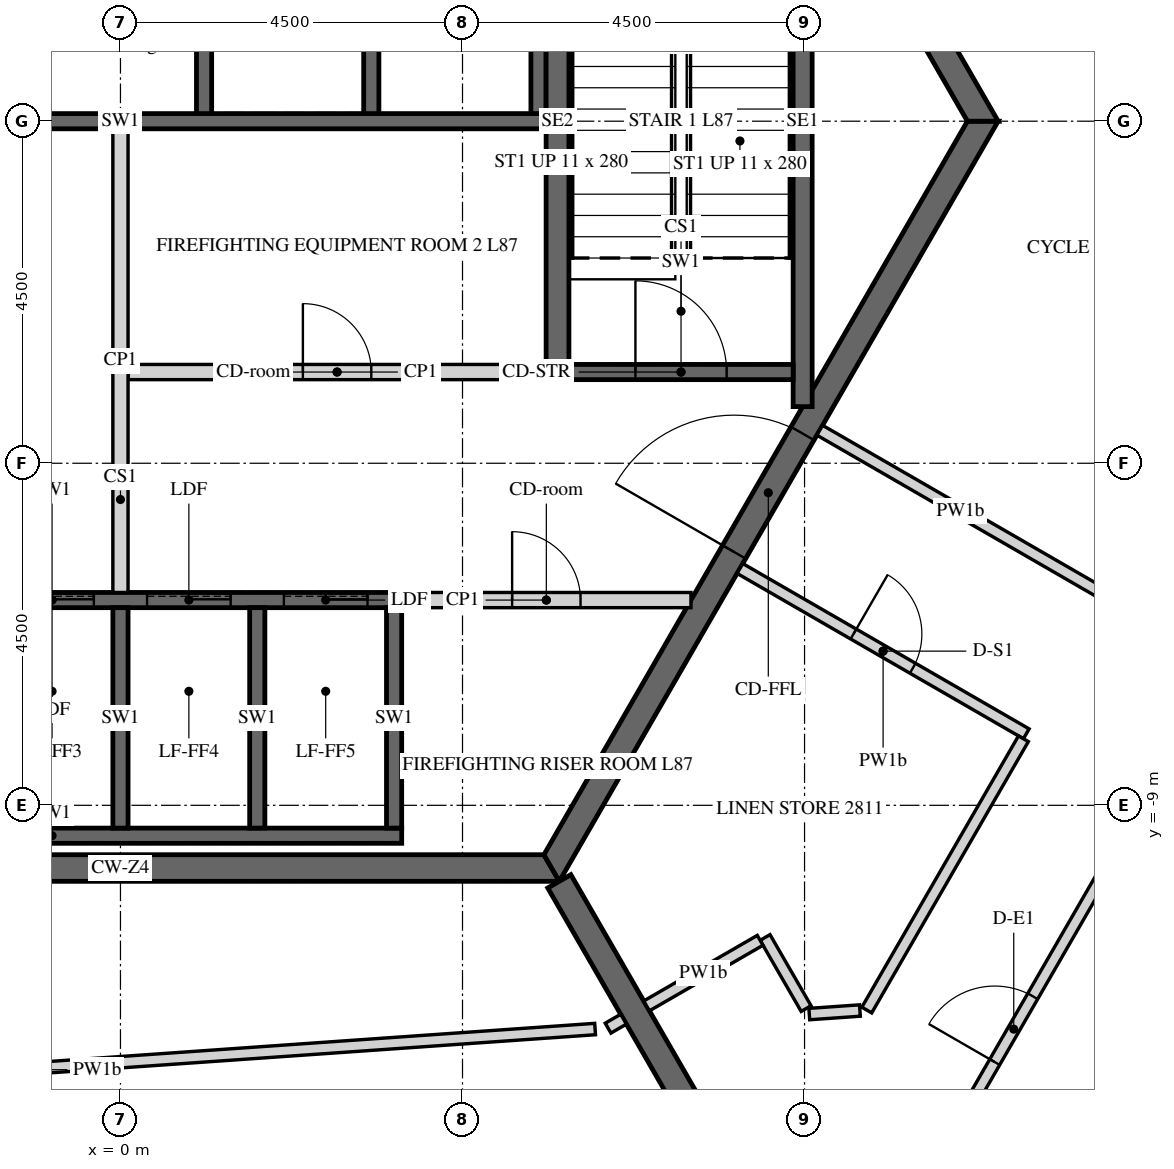
"""IFC4 building model, lengths in metres.
Left out: names, types, materials, properties, quantities, classifications, styles, units other than length and angle.
Written with IfcOpenShell. Run it as: python <this file> out.ifc"""

import sys

from ifc_helpers import new_model, si_unit, direction, frame, frame_2d, origin, place, context, subcontext, project, spatial, polyline, rectangle, outline, extrude, element, fill, save


model = new_model("IFC4")
c1 = context("Model", 3, precision=1e-05, world=origin(), true_north=direction((0.0, 1.0)))
c2 = subcontext(c1, "Body", "Model", "MODEL_VIEW")
j1 = project(units=[si_unit("LENGTHUNIT", "METRE"), si_unit("PLANEANGLEUNIT", "RADIAN")], contexts=[c1])
p1 = place(None, origin())
s1 = spatial("IfcSite", under=j1, at=p1, CompositionType="ELEMENT")
p2 = place(p1, origin())
s2 = spatial("IfcBuilding", under=s1, at=p2, CompositionType="ELEMENT")
p3 = place(p2, frame((0.0, 0.0, 361.2)))
s3 = spatial("IfcBuildingStorey", under=s2, at=p3, CompositionType="ELEMENT", Elevation=361.2)
p4 = place(p3, frame((-5.673, -9.825, -0.15), z_axis=(0.0, 0.0, 1.0), x_axis=(1.0, 0.0, 0.0)))
e1 = element("IfcWall", 1, at=p4, inside=s3, PredefinedType="SHEAR", context=c2, shape_type="SweptSolid", body=[
    extrude(outline(polyline([(-0.101, -0.175), (11.446, -0.175), (11.244, 0.175), (0.101, 0.175), (-0.101, -0.175)])), origin(), (0.0, 0.0, 1.0), 3.9),
])
p5 = place(p3, frame((5.673, -9.825, -0.15), z_axis=(0.0, 0.0, 1.0), x_axis=(0.499995046907, 0.866028263435, 0.0)))
e2 = element("IfcWall", 2, at=p5, inside=s3, PredefinedType="SHEAR", context=c2, shape_type="SweptSolid", body=[
    extrude(outline(polyline([(-0.101, -0.175), (11.446, -0.175), (11.244, 0.175), (0.101, 0.175), (-0.101, -0.175)])), origin(), (0.0, 0.0, 1.0), 3.9),
])
p6 = place(p5, frame((4.801, 0.0, 0.15)))
e3 = element("IfcOpeningElement", 3, at=p6, cuts=e2, PredefinedType="OPENING", context=c2, shape_type="SweptSolid", body=[
    extrude(rectangle(XDim=1.8, YDim=2.4, at=frame_2d((0.9, 1.2))), frame((0.0, 0.185, 0.0), z_axis=(0.0, -1.0, 0.0), x_axis=(1.0, 0.0, 0.0)), (0.0, 0.0, 1.0), 0.37),
])
p7 = place(p3, frame((11.345, 0.0, -0.15), z_axis=(0.0, 0.0, 1.0), x_axis=(-0.499995046907, 0.866028263435, 0.0)))
e4 = element("IfcWall", 4, at=p7, inside=s3, PredefinedType="SHEAR", context=c2, shape_type="SweptSolid", body=[
    extrude(outline(polyline([(-0.101, -0.175), (11.446, -0.175), (11.244, 0.175), (0.101, 0.175), (-0.101, -0.175)])), origin(), (0.0, 0.0, 1.0), 3.9),
])
p8 = place(p7, frame((4.744, 0.0, 0.15)))
e5 = element("IfcOpeningElement", 5, at=p8, cuts=e4, PredefinedType="OPENING", context=c2, shape_type="SweptSolid", body=[
    extrude(rectangle(XDim=1.8, YDim=2.4, at=frame_2d((0.9, 1.2))), frame((0.0, 0.185, 0.0), z_axis=(0.0, -1.0, 0.0), x_axis=(1.0, 0.0, 0.0)), (0.0, 0.0, 1.0), 0.37),
])
p9 = place(p3, frame((5.773, -10.0, -0.15), z_axis=(0.0, 0.0, 1.0), x_axis=(0.500007911273, -0.866020836161, 0.0)))
e6 = element("IfcWall", 6, at=p9, inside=s3, PredefinedType="SHEAR", context=c2, shape_type="SweptSolid", body=[
    extrude(rectangle(XDim=14.51, YDim=0.35, at=frame_2d((7.255, 0.0))), origin(), (0.0, 0.0, 1.0), 3.9),
])
p10 = place(p9, frame((6.355, 0.0, 0.15)))
e7 = element("IfcOpeningElement", 7, at=p10, cuts=e6, PredefinedType="OPENING", context=c2, shape_type="SweptSolid", body=[
    extrude(rectangle(XDim=1.8, YDim=2.4, at=frame_2d((0.9, 1.2))), frame((0.0, 0.185, 0.0), z_axis=(0.0, -1.0, 0.0), x_axis=(1.0, 0.0, 0.0)), (0.0, 0.0, 1.0), 0.37),
])
p11 = place(p3, frame((-5.6, 0.0, -0.25), z_axis=(0.0, 0.0, 1.0), x_axis=(1.0, 0.0, 0.0)))
e8 = element("IfcWall", 8, at=p11, inside=s3, PredefinedType="SHEAR", context=c2, shape_type="SweptSolid", body=[
    extrude(rectangle(XDim=11.2, YDim=0.2, at=frame_2d((5.6, 0.0))), origin(), (0.0, 0.0, 1.0), 3.9),
])
for number, where, z_axis, x_axis in (
    (9, (1.1, 0.1, -0.25), (0.0, 0.0, 1.0), (0.0, 1.0, 0.0)),
    (10, (3.3, 0.1, -0.25), (0.0, 0.0, 1.0), (0.0, 1.0, 0.0)),
):
    element("IfcWall", number, at=place(p3, frame(where, z_axis=z_axis, x_axis=x_axis)), inside=s3, PredefinedType="SHEAR", context=c2, shape_type="SweptSolid", body=[
        extrude(rectangle(XDim=3.3, YDim=0.2, at=frame_2d((1.65, 0.0))), origin(), (0.0, 0.0, 1.0), 3.9),
    ])
p12 = place(p3, frame((5.5, 0.1, -0.25), z_axis=(0.0, 0.0, 1.0), x_axis=(0.0, 1.0, 0.0)))
e11 = element("IfcWall", 11, at=p12, inside=s3, PredefinedType="SHEAR", context=c2, shape_type="SweptSolid", body=[
    extrude(rectangle(XDim=3.1, YDim=0.2, at=frame_2d((1.55, 0.0))), origin(), (0.0, 0.0, 1.0), 3.9),
])
p13 = place(p3, frame((-5.5, -6.3, -0.25), z_axis=(0.0, 0.0, 1.0), x_axis=(1.0, 0.0, 0.0)))
e12 = element("IfcWall", 12, at=p13, inside=s3, PredefinedType="SHEAR", context=c2, shape_type="SweptSolid", body=[
    extrude(rectangle(XDim=9.2, YDim=0.2, at=frame_2d((4.6, 0.0))), origin(), (0.0, 0.0, 1.0), 3.9),
])
p14 = place(p13, frame((0.45, 0.0, 0.25)))
e13 = element("IfcOpeningElement", 13, at=p14, cuts=e12, PredefinedType="OPENING", context=c2, shape_type="SweptSolid", body=[
    extrude(rectangle(XDim=1.1, YDim=2.1, at=frame_2d((0.55, 1.05))), frame((0.0, 0.11, 0.0), z_axis=(0.0, -1.0, 0.0), x_axis=(1.0, 0.0, 0.0)), (0.0, 0.0, 1.0), 0.22),
])
p15 = place(p13, frame((2.25, 0.0, 0.25)))
e14 = element("IfcOpeningElement", 14, at=p15, cuts=e12, PredefinedType="OPENING", context=c2, shape_type="SweptSolid", body=[
    extrude(rectangle(XDim=1.1, YDim=2.1, at=frame_2d((0.55, 1.05))), frame((0.0, 0.11, 0.0), z_axis=(0.0, -1.0, 0.0), x_axis=(1.0, 0.0, 0.0)), (0.0, 0.0, 1.0), 0.22),
])
p16 = place(p13, frame((4.05, 0.0, 0.25)))
e15 = element("IfcOpeningElement", 15, at=p16, cuts=e12, PredefinedType="OPENING", context=c2, shape_type="SweptSolid", body=[
    extrude(rectangle(XDim=1.1, YDim=2.1, at=frame_2d((0.55, 1.05))), frame((0.0, 0.11, 0.0), z_axis=(0.0, -1.0, 0.0), x_axis=(1.0, 0.0, 0.0)), (0.0, 0.0, 1.0), 0.22),
])
p17 = place(p13, frame((5.85, 0.0, 0.25)))
e16 = element("IfcOpeningElement", 16, at=p17, cuts=e12, PredefinedType="OPENING", context=c2, shape_type="SweptSolid", body=[
    extrude(rectangle(XDim=1.1, YDim=2.1, at=frame_2d((0.55, 1.05))), frame((0.0, 0.11, 0.0), z_axis=(0.0, -1.0, 0.0), x_axis=(1.0, 0.0, 0.0)), (0.0, 0.0, 1.0), 0.22),
])
p18 = place(p13, frame((7.65, 0.0, 0.25)))
e17 = element("IfcOpeningElement", 17, at=p18, cuts=e12, PredefinedType="OPENING", context=c2, shape_type="SweptSolid", body=[
    extrude(rectangle(XDim=1.1, YDim=2.1, at=frame_2d((0.55, 1.05))), frame((0.0, 0.11, 0.0), z_axis=(0.0, -1.0, 0.0), x_axis=(1.0, 0.0, 0.0)), (0.0, 0.0, 1.0), 0.22),
])
p19 = place(p3, frame((-5.5, -9.4, -0.25), z_axis=(0.0, 0.0, 1.0), x_axis=(1.0, 0.0, 0.0)))
e18 = element("IfcWall", 18, at=p19, inside=s3, PredefinedType="SHEAR", context=c2, shape_type="SweptSolid", body=[
    extrude(rectangle(XDim=9.2, YDim=0.2, at=frame_2d((4.6, 0.0))), origin(), (0.0, 0.0, 1.0), 3.9),
])
for number, where, z_axis, x_axis in (
    (19, (0.0, -9.3, -0.25), (0.0, 0.0, 1.0), (0.0, 1.0, 0.0)),
    (20, (1.8, -9.3, -0.25), (0.0, 0.0, 1.0), (0.0, 1.0, 0.0)),
    (21, (3.6, -9.3, -0.25), (0.0, 0.0, 1.0), (0.0, 1.0, 0.0)),
):
    element("IfcWall", number, at=place(p3, frame(where, z_axis=z_axis, x_axis=x_axis)), inside=s3, PredefinedType="SHEAR", context=c2, shape_type="SweptSolid", body=[
        extrude(rectangle(XDim=2.9, YDim=0.2, at=frame_2d((1.45, 0.0))), origin(), (0.0, 0.0, 1.0), 3.9),
    ])
p20 = place(p3, frame((0.1, -3.3, 0.0), z_axis=(0.0, 0.0, 1.0), x_axis=(1.0, 0.0, 0.0)))
e22 = element("IfcWall", 22, at=p20, inside=s3, PredefinedType="PARTITIONING", context=c2, shape_type="SweptSolid", body=[
    extrude(rectangle(XDim=5.5, YDim=0.2, at=frame_2d((2.75, 0.0))), origin(), (0.0, 0.0, 1.0), 3.65),
])
p21 = place(p20, frame((2.3, 0.0, 0.0)))
e23 = element("IfcOpeningElement", 23, at=p21, cuts=e22, PredefinedType="OPENING", context=c2, shape_type="SweptSolid", body=[
    extrude(rectangle(XDim=0.9, YDim=2.1, at=frame_2d((0.45, 1.05))), frame((0.0, 0.11, 0.0), z_axis=(0.0, -1.0, 0.0), x_axis=(1.0, 0.0, 0.0)), (0.0, 0.0, 1.0), 0.22),
])
p22 = place(p3, frame((0.0, -6.2, 0.0), z_axis=(0.0, 0.0, 1.0), x_axis=(0.0, 1.0, 0.0)))
e24 = element("IfcWall", 24, at=p22, inside=s3, PredefinedType="PARTITIONING", context=c2, shape_type="SweptSolid", body=[
    extrude(rectangle(XDim=6.1, YDim=0.2, at=frame_2d((3.05, 0.0))), origin(), (0.0, 0.0, 1.0), 3.65),
])
p23 = place(p3, frame((3.7, -6.3, 0.0), z_axis=(0.0, 0.0, 1.0), x_axis=(1.0, 0.0, 0.0)))
e25 = element("IfcWall", 25, at=p23, inside=s3, PredefinedType="PARTITIONING", context=c2, shape_type="SweptSolid", body=[
    extrude(rectangle(XDim=3.806, YDim=0.2, at=frame_2d((1.903, 0.0))), origin(), (0.0, 0.0, 1.0), 3.65),
])
p24 = place(p23, frame((1.453, 0.0, 0.0)))
e26 = element("IfcOpeningElement", 26, at=p24, cuts=e25, PredefinedType="OPENING", context=c2, shape_type="SweptSolid", body=[
    extrude(rectangle(XDim=0.9, YDim=2.1, at=frame_2d((0.45, 1.05))), frame((0.0, 0.11, 0.0), z_axis=(0.0, -1.0, 0.0), x_axis=(1.0, 0.0, 0.0)), (0.0, 0.0, 1.0), 0.22),
])
p25 = place(p3, frame((5.75, -3.4, -0.25), z_axis=(0.0, 0.0, 1.0), x_axis=(0.0, 1.0, 0.0)))
e27 = element("IfcWall", 27, at=p25, inside=s3, PredefinedType="SHEAR", context=c2, shape_type="SweptSolid", body=[
    extrude(rectangle(XDim=6.8, YDim=0.3, at=frame_2d((3.4, 0.0))), origin(), (0.0, 0.0, 1.0), 3.9),
])
p26 = place(p3, frame((8.975, -3.755, -0.25), z_axis=(0.0, 0.0, 1.0), x_axis=(0.0, 1.0, 0.0)))
e28 = element("IfcWall", 28, at=p26, inside=s3, PredefinedType="SHEAR", context=c2, shape_type="SweptSolid", body=[
    extrude(rectangle(XDim=7.51, YDim=0.25, at=frame_2d((3.755, 0.0))), origin(), (0.0, 0.0, 1.0), 3.9),
])
p27 = place(p3, frame((5.9, -3.3, -0.25), z_axis=(0.0, 0.0, 1.0), x_axis=(1.0, 0.0, 0.0)))
e29 = element("IfcWall", 29, at=p27, inside=s3, PredefinedType="SHEAR", context=c2, shape_type="SweptSolid", body=[
    extrude(rectangle(XDim=2.95, YDim=0.2, at=frame_2d((1.475, 0.0))), origin(), (0.0, 0.0, 1.0), 3.9),
])
p28 = place(p27, frame((0.875, 0.0, 0.25)))
e30 = element("IfcOpeningElement", 30, at=p28, cuts=e29, PredefinedType="OPENING", context=c2, shape_type="SweptSolid", body=[
    extrude(rectangle(XDim=1.2, YDim=2.4, at=frame_2d((0.6, 1.2))), frame((0.0, 0.11, 0.0), z_axis=(0.0, -1.0, 0.0), x_axis=(1.0, 0.0, 0.0)), (0.0, 0.0, 1.0), 0.22),
])
p29 = place(p3, frame((6.619, -11.814, 0.0), z_axis=(0.0, 0.0, 1.0), x_axis=(-0.865544827262, -0.500831460673, 0.0)))
e31 = element("IfcWall", 31, at=p29, inside=s3, PredefinedType="PARTITIONING", context=c2, shape_type="SweptSolid", body=[
    extrude(rectangle(XDim=0.235, YDim=0.15, at=frame_2d((0.117, 0.0))), origin(), (0.0, 0.0, 1.0), 2.82),
])
p30 = place(p3, frame((6.245, -11.944, 0.0), z_axis=(0.0, 0.0, 1.0), x_axis=(-0.997564707029, -0.069747080866, 0.0)))
e32 = element("IfcWall", 32, at=p30, inside=s3, PredefinedType="PARTITIONING", context=c2, shape_type="SweptSolid", body=[
    extrude(rectangle(XDim=15.339, YDim=0.15, at=frame_2d((7.669, 0.0))), origin(), (0.0, 0.0, 1.0), 2.82),
])
p31 = place(p30, frame((7.219, 0.0, 0.0)))
e33 = element("IfcOpeningElement", 33, at=p31, cuts=e32, PredefinedType="OPENING", context=c2, shape_type="SweptSolid", body=[
    extrude(rectangle(XDim=0.9, YDim=2.1, at=frame_2d((0.45, 1.05))), frame((0.0, 0.085, 0.0), z_axis=(0.0, -1.0, 0.0), x_axis=(1.0, 0.0, 0.0)), (0.0, 0.0, 1.0), 0.17),
])
p32 = place(p3, frame((10.944, -13.344, 0.0), z_axis=(0.0, 0.0, 1.0), x_axis=(0.500003210163, 0.866023550388, 0.0)))
e34 = element("IfcWall", 34, at=p32, inside=s3, PredefinedType="PARTITIONING", context=c2, shape_type="SweptSolid", body=[
    extrude(rectangle(XDim=13.951, YDim=0.15, at=frame_2d((6.975, 0.0))), origin(), (0.0, 0.0, 1.0), 2.82),
])
p33 = place(p32, frame((1.116, 0.0, 0.0)))
e35 = element("IfcOpeningElement", 35, at=p33, cuts=e34, PredefinedType="OPENING", context=c2, shape_type="SweptSolid", body=[
    extrude(rectangle(XDim=1.0, YDim=2.1, at=frame_2d((0.5, 1.05))), frame((0.0, 0.085, 0.0), z_axis=(0.0, -1.0, 0.0), x_axis=(1.0, 0.0, 0.0)), (0.0, 0.0, 1.0), 0.17),
])
p34 = place(p32, frame((10.416, 0.0, 0.0)))
e36 = element("IfcOpeningElement", 36, at=p34, cuts=e34, PredefinedType="OPENING", context=c2, shape_type="SweptSolid", body=[
    extrude(rectangle(XDim=1.0, YDim=2.1, at=frame_2d((0.5, 1.05))), frame((0.0, 0.085, 0.0), z_axis=(0.0, -1.0, 0.0), x_axis=(1.0, 0.0, 0.0)), (0.0, 0.0, 1.0), 0.17),
])
p35 = place(p3, frame((17.873, -1.193, 0.0), z_axis=(0.0, 0.0, 1.0), x_axis=(-0.559188435605, 0.829040586151, 0.0)))
e37 = element("IfcWall", 37, at=p35, inside=s3, PredefinedType="PARTITIONING", context=c2, shape_type="SweptSolid", body=[
    extrude(rectangle(XDim=15.688, YDim=0.15, at=frame_2d((7.844, 0.0))), origin(), (0.0, 0.0, 1.0), 2.82),
])
p36 = place(p3, frame((11.368, 5.231, 0.0), z_axis=(0.0, 0.0, 1.0), x_axis=(0.55919388604, -0.829036909803, 0.0)))
e38 = element("IfcWall", 38, at=p36, inside=s3, PredefinedType="PARTITIONING", context=c2, shape_type="SweptSolid", body=[
    extrude(rectangle(XDim=7.922, YDim=0.15, at=frame_2d((3.961, 0.0))), origin(), (0.0, 0.0, 1.0), 2.82),
])
p37 = place(p36, frame((3.511, 0.0, 0.0)))
e39 = element("IfcOpeningElement", 39, at=p37, cuts=e38, PredefinedType="OPENING", context=c2, shape_type="SweptSolid", body=[
    extrude(rectangle(XDim=0.9, YDim=2.1, at=frame_2d((0.45, 1.05))), frame((0.0, 0.085, 0.0), z_axis=(0.0, -1.0, 0.0), x_axis=(1.0, 0.0, 0.0)), (0.0, 0.0, 1.0), 0.17),
])
p38 = place(p3, frame((12.902, -6.203, 0.0), z_axis=(0.0, 0.0, 1.0), x_axis=(-0.866023907196, 0.500002592159, 0.0)))
e40 = element("IfcWall", 40, at=p38, inside=s3, PredefinedType="PARTITIONING", context=c2, shape_type="SweptSolid", body=[
    extrude(rectangle(XDim=4.275, YDim=0.15, at=frame_2d((2.137, 0.0))), origin(), (0.0, 0.0, 1.0), 2.82),
])
p39 = place(p3, frame((8.15, -5.884, 0.0), z_axis=(0.0, 0.0, 1.0), x_axis=(0.866027639635, -0.499996127374, 0.0)))
e41 = element("IfcWall", 41, at=p39, inside=s3, PredefinedType="PARTITIONING", context=c2, shape_type="SweptSolid", body=[
    extrude(rectangle(XDim=4.35, YDim=0.15, at=frame_2d((2.175, 0.0))), origin(), (0.0, 0.0, 1.0), 2.82),
])
p40 = place(p39, frame((1.725, 0.0, 0.0)))
e42 = element("IfcOpeningElement", 42, at=p40, cuts=e41, PredefinedType="OPENING", context=c2, shape_type="SweptSolid", body=[
    extrude(rectangle(XDim=0.9, YDim=2.1, at=frame_2d((0.45, 1.05))), frame((0.0, 0.085, 0.0), z_axis=(0.0, -1.0, 0.0), x_axis=(1.0, 0.0, 0.0)), (0.0, 0.0, 1.0), 0.17),
])
p41 = place(p3, frame((11.879, -8.124, 0.0), z_axis=(0.0, 0.0, 1.0), x_axis=(-0.500006178143, -0.866021836803, 0.0)))
e43 = element("IfcWall", 43, at=p41, inside=s3, PredefinedType="PARTITIONING", context=c2, shape_type="SweptSolid", body=[
    extrude(rectangle(XDim=4.122, YDim=0.15, at=frame_2d((2.061, 0.0))), origin(), (0.0, 0.0, 1.0), 2.82),
])
p42 = place(p3, frame((9.729, -11.7, 0.0), z_axis=(0.0, 0.0, 1.0), x_axis=(-0.997585124395, -0.069454442519, 0.0)))
e44 = element("IfcWall", 44, at=p42, inside=s3, PredefinedType="PARTITIONING", context=c2, shape_type="SweptSolid", body=[
    extrude(rectangle(XDim=0.668, YDim=0.15, at=frame_2d((0.334, 0.0))), origin(), (0.0, 0.0, 1.0), 2.82),
])
p43 = place(p3, frame((9.021, -11.674, 0.0), z_axis=(0.0, 0.0, 1.0), x_axis=(-0.500126914667, 0.865952117167, 0.0)))
e45 = element("IfcWall", 45, at=p43, inside=s3, PredefinedType="PARTITIONING", context=c2, shape_type="SweptSolid", body=[
    extrude(rectangle(XDim=1.08, YDim=0.15, at=frame_2d((0.54, 0.0))), origin(), (0.0, 0.0, 1.0), 2.82),
])
p44 = place(p3, frame((8.416, -10.777, 0.0), z_axis=(0.0, 0.0, 1.0), x_axis=(-0.866074815912, -0.499914405916, 0.0)))
e46 = element("IfcWall", 46, at=p44, inside=s3, PredefinedType="PARTITIONING", context=c2, shape_type="SweptSolid", body=[
    extrude(rectangle(XDim=1.725, YDim=0.15, at=frame_2d((0.862, 0.0))), origin(), (0.0, 0.0, 1.0), 2.82),
])
p45 = place(p6, origin())
e47 = element("IfcDoor", 47, at=p45, inside=s3, OperationType="DOUBLE_DOOR_SINGLE_SWING", PredefinedType="DOOR", context=c2, shape_type="SweptSolid", body=[
    extrude(rectangle(XDim=1.8, YDim=2.4, at=frame_2d((0.9, 1.2))), frame((0.0, 0.025, 0.0), z_axis=(0.0, -1.0, 0.0), x_axis=(1.0, 0.0, 0.0)), (0.0, 0.0, 1.0), 0.05),
])
fill(e3, e47)
p46 = place(p21, origin())
e48 = element("IfcDoor", 48, at=p46, inside=s3, OperationType="SINGLE_SWING_LEFT", PredefinedType="DOOR", context=c2, shape_type="SweptSolid", body=[
    extrude(rectangle(XDim=0.9, YDim=2.1, at=frame_2d((0.45, 1.05))), frame((0.0, 0.025, 0.0), z_axis=(0.0, -1.0, 0.0), x_axis=(1.0, 0.0, 0.0)), (0.0, 0.0, 1.0), 0.05),
])
fill(e23, e48)
p47 = place(p24, origin())
e49 = element("IfcDoor", 49, at=p47, inside=s3, OperationType="SINGLE_SWING_LEFT", PredefinedType="DOOR", context=c2, shape_type="SweptSolid", body=[
    extrude(rectangle(XDim=0.9, YDim=2.1, at=frame_2d((0.45, 1.05))), frame((0.0, 0.025, 0.0), z_axis=(0.0, -1.0, 0.0), x_axis=(1.0, 0.0, 0.0)), (0.0, 0.0, 1.0), 0.05),
])
fill(e26, e49)
p48 = place(p28, origin())
e50 = element("IfcDoor", 50, at=p48, inside=s3, OperationType="SINGLE_SWING_LEFT", PredefinedType="DOOR", context=c2, shape_type="SweptSolid", body=[
    extrude(rectangle(XDim=1.2, YDim=2.4, at=frame_2d((0.6, 1.2))), frame((0.0, 0.025, 0.0), z_axis=(0.0, -1.0, 0.0), x_axis=(1.0, 0.0, 0.0)), (0.0, 0.0, 1.0), 0.05),
])
fill(e30, e50)
p49 = place(p16, origin())
e51 = element("IfcDoor", 51, at=p49, inside=s3, OperationType="SLIDING_TO_LEFT", PredefinedType="DOOR", context=c2, shape_type="SweptSolid", body=[
    extrude(rectangle(XDim=1.1, YDim=2.1, at=frame_2d((0.55, 1.05))), frame((0.0, 0.025, 0.0), z_axis=(0.0, -1.0, 0.0), x_axis=(1.0, 0.0, 0.0)), (0.0, 0.0, 1.0), 0.05),
])
fill(e15, e51)
p50 = place(p17, origin())
e52 = element("IfcDoor", 52, at=p50, inside=s3, OperationType="SLIDING_TO_LEFT", PredefinedType="DOOR", context=c2, shape_type="SweptSolid", body=[
    extrude(rectangle(XDim=1.1, YDim=2.1, at=frame_2d((0.55, 1.05))), frame((0.0, 0.025, 0.0), z_axis=(0.0, -1.0, 0.0), x_axis=(1.0, 0.0, 0.0)), (0.0, 0.0, 1.0), 0.05),
])
fill(e16, e52)
p51 = place(p18, origin())
e53 = element("IfcDoor", 53, at=p51, inside=s3, OperationType="SLIDING_TO_LEFT", PredefinedType="DOOR", context=c2, shape_type="SweptSolid", body=[
    extrude(rectangle(XDim=1.1, YDim=2.1, at=frame_2d((0.55, 1.05))), frame((0.0, 0.025, 0.0), z_axis=(0.0, -1.0, 0.0), x_axis=(1.0, 0.0, 0.0)), (0.0, 0.0, 1.0), 0.05),
])
fill(e17, e53)
p52 = place(p33, origin())
e54 = element("IfcDoor", 54, at=p52, inside=s3, OperationType="SINGLE_SWING_RIGHT", PredefinedType="DOOR", context=c2, shape_type="SweptSolid", body=[
    extrude(rectangle(XDim=1.0, YDim=2.1, at=frame_2d((0.5, 1.05))), frame((0.0, 0.025, 0.0), z_axis=(0.0, -1.0, 0.0), x_axis=(1.0, 0.0, 0.0)), (0.0, 0.0, 1.0), 0.05),
])
fill(e35, e54)
p53 = place(p40, origin())
e55 = element("IfcDoor", 55, at=p53, inside=s3, OperationType="SINGLE_SWING_LEFT", PredefinedType="DOOR", context=c2, shape_type="SweptSolid", body=[
    extrude(rectangle(XDim=0.9, YDim=2.1, at=frame_2d((0.45, 1.05))), frame((0.0, 0.025, 0.0), z_axis=(0.0, -1.0, 0.0), x_axis=(1.0, 0.0, 0.0)), (0.0, 0.0, 1.0), 0.05),
])
fill(e42, e55)
save(model, sys.argv[1])
